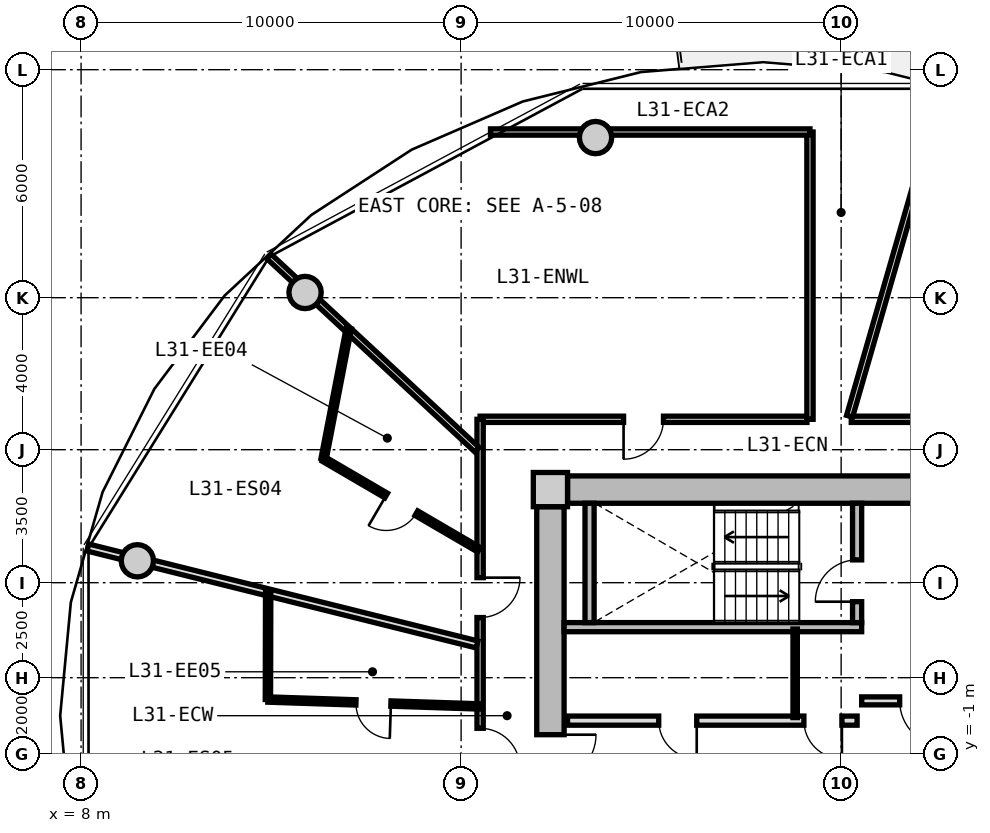
"""IFC4 building model, lengths in metres.
Left out: names, types, materials, properties, quantities, classifications, styles, units other than length and angle.
Written with IfcOpenShell. Run it as: python <this file> out.ifc"""

import sys

from ifc_helpers import new_model, si_unit, direction, frame, frame_2d, origin, origin_2d, place, context, subcontext, project, spatial, rectangle, circle, extrude, source, transform, mapped, element, fill, save


model = new_model("IFC4")
c1 = context("Model", 3, precision=1e-05, world=origin(), true_north=direction((0.0, 1.0)))
c2 = subcontext(c1, "Body", "Model", "MODEL_VIEW")
j1 = project(units=[si_unit("LENGTHUNIT", "METRE"), si_unit("PLANEANGLEUNIT", "RADIAN")], contexts=[c1])
p1 = place(None, origin())
s1 = spatial("IfcSite", under=j1, at=p1, CompositionType="ELEMENT")
p2 = place(p1, origin())
s2 = spatial("IfcBuilding", under=s1, at=p2, CompositionType="ELEMENT")
p3 = place(p2, frame((0.0, 0.0, 102.35)))
s3 = spatial("IfcBuildingStorey", under=s2, at=p3, CompositionType="ELEMENT", Elevation=102.35)
m1 = source(origin(), c2, "Body", "SweptSolid", [
    extrude(rectangle(XDim=0.9, YDim=0.9, at=origin_2d()), origin(), (0.0, 0.0, 1.0), 3.05),
])
p4 = place(p3, frame((20.35, 5.95, 0.0), z_axis=(0.0, 0.0, 1.0), x_axis=(1.0, 0.0, 0.0)))
e1 = element("IfcColumn", 1, at=p4, inside=s3, PredefinedType="COLUMN", context=c2, shape_type="MappedRepresentation", body=[
    mapped(m1, transform((0.0, 0.0, 0.0), x_axis=(1.0, 0.0, 0.0), y_axis=(0.0, 1.0, 0.0), z_axis=(0.0, 0.0, 1.0), scale=1.0)),
])
m2 = source(origin(), c2, "Body", "SweptSolid", [
    extrude(rectangle(XDim=14.4, YDim=0.72, at=frame_2d((7.2, 0.0))), origin(), (0.0, 0.0, 1.0), 2.79),
])
p5 = place(p3, frame((20.8, 5.95, 0.0), z_axis=(0.0, 0.0, 1.0), x_axis=(1.0, 0.0, 0.0)))
e2 = element("IfcWall", 2, at=p5, inside=s3, PredefinedType="SHEAR", context=c2, shape_type="MappedRepresentation", body=[
    mapped(m2, transform((0.0, 0.0, 0.0), x_axis=(1.0, 0.0, 0.0), y_axis=(0.0, 1.0, 0.0), z_axis=(0.0, 0.0, 1.0), scale=1.0)),
])
m3 = source(origin(), c2, "Body", "SweptSolid", [
    extrude(rectangle(XDim=11.0, YDim=0.72, at=frame_2d((5.5, 0.0))), origin(), (0.0, 0.0, 1.0), 2.79),
])
p6 = place(p3, frame((20.35, -5.5, 0.0), z_axis=(0.0, 0.0, 1.0), x_axis=(0.0, 1.0, 0.0)))
e3 = element("IfcWall", 3, at=p6, inside=s3, PredefinedType="SHEAR", context=c2, shape_type="MappedRepresentation", body=[
    mapped(m3, transform((0.0, 0.0, 0.0), x_axis=(1.0, 0.0, 0.0), y_axis=(0.0, 1.0, 0.0), z_axis=(0.0, 0.0, 1.0), scale=1.0)),
])
p7 = place(p6, frame((3.8, 0.0, 0.0)))
e4 = element("IfcOpeningElement", 4, at=p7, cuts=e3, PredefinedType="OPENING", context=c2, shape_type="SweptSolid", body=[
    extrude(rectangle(XDim=1.2, YDim=2.15, at=frame_2d((0.6, 1.075))), frame((0.0, 0.37, 0.0), z_axis=(0.0, -1.0, 0.0), x_axis=(1.0, 0.0, 0.0)), (0.0, 0.0, 1.0), 0.74),
])
m4 = source(origin(), c2, "Body", "SweptSolid", [
    extrude(circle(Radius=0.425, at=origin_2d()), origin(), (0.0, 0.0, 1.0), 3.05),
])
for number, where, z_axis, x_axis in (
    (5, (21.537, 15.213, 0.0), (0.0, 0.0, 1.0), (1.0, 0.0, 0.0)),
    (6, (13.894, 11.137, 0.0), (0.0, 0.0, 1.0), (1.0, 0.0, 0.0)),
    (7, (9.481, 4.076, 0.0), (0.0, 0.0, 1.0), (1.0, 0.0, 0.0)),
):
    element("IfcColumn", number, at=place(p3, frame(where, z_axis=z_axis, x_axis=x_axis)), inside=s3, PredefinedType="COLUMN", context=c2, shape_type="MappedRepresentation", body=[
        mapped(m4, transform((0.0, 0.0, 0.0), x_axis=(1.0, 0.0, 0.0), y_axis=(0.0, 1.0, 0.0), z_axis=(0.0, 0.0, 1.0), scale=1.0)),
    ])
m5 = source(origin(), c2, "Body", "SweptSolid", [
    extrude(rectangle(XDim=7.83, YDim=0.24, at=frame_2d((3.915, 0.0))), origin(), (0.0, 0.0, 1.0), 2.79),
])
p8 = place(p3, frame((20.71, 2.33, 0.0), z_axis=(0.0, 0.0, 1.0), x_axis=(1.0, 0.0, 0.0)))
e8 = element("IfcWall", 8, at=p8, inside=s3, PredefinedType="PARTITIONING", context=c2, shape_type="MappedRepresentation", body=[
    mapped(m5, transform((0.0, 0.0, 0.0), x_axis=(1.0, 0.0, 0.0), y_axis=(0.0, 1.0, 0.0), z_axis=(0.0, 0.0, 1.0), scale=1.0)),
])
m6 = source(origin(), c2, "Body", "SweptSolid", [
    extrude(rectangle(XDim=3.14, YDim=0.24, at=frame_2d((1.57, 0.0))), origin(), (0.0, 0.0, 1.0), 2.79),
])
p9 = place(p3, frame((21.38, 2.45, 0.0), z_axis=(0.0, 0.0, 1.0), x_axis=(0.0, 1.0, 0.0)))
e9 = element("IfcWall", 9, at=p9, inside=s3, PredefinedType="PARTITIONING", context=c2, shape_type="MappedRepresentation", body=[
    mapped(m6, transform((0.0, 0.0, 0.0), x_axis=(1.0, 0.0, 0.0), y_axis=(0.0, 1.0, 0.0), z_axis=(0.0, 0.0, 1.0), scale=1.0)),
])
p10 = place(p3, frame((28.42, 2.45, 0.0), z_axis=(0.0, 0.0, 1.0), x_axis=(0.0, 1.0, 0.0)))
e10 = element("IfcWall", 10, at=p10, inside=s3, PredefinedType="PARTITIONING", context=c2, shape_type="MappedRepresentation", body=[
    mapped(m6, transform((0.0, 0.0, 0.0), x_axis=(1.0, 0.0, 0.0), y_axis=(0.0, 1.0, 0.0), z_axis=(0.0, 0.0, 1.0), scale=1.0)),
])
p11 = place(p10, frame((0.55, 0.0, 0.0)))
e11 = element("IfcOpeningElement", 11, at=p11, cuts=e10, PredefinedType="OPENING", context=c2, shape_type="SweptSolid", body=[
    extrude(rectangle(XDim=1.1, YDim=2.15, at=frame_2d((0.55, 1.075))), frame((0.0, 0.13, 0.0), z_axis=(0.0, -1.0, 0.0), x_axis=(1.0, 0.0, 0.0)), (0.0, 0.0, 1.0), 0.26),
])
m7 = source(origin(), c2, "Body", "SweptSolid", [
    extrude(rectangle(XDim=6.66, YDim=0.21, at=frame_2d((3.33, 0.0))), origin(), (0.0, 0.0, 1.0), 2.775),
])
p12 = place(p3, frame((28.54, 0.39, 0.0), z_axis=(0.0, 0.0, 1.0), x_axis=(1.0, 0.0, 0.0)))
e12 = element("IfcWall", 12, at=p12, inside=s3, PredefinedType="PARTITIONING", context=c2, shape_type="MappedRepresentation", body=[
    mapped(m7, transform((0.0, 0.0, 0.0), x_axis=(1.0, 0.0, 0.0), y_axis=(0.0, 1.0, 0.0), z_axis=(0.0, 0.0, 1.0), scale=1.0)),
])
p13 = place(p12, frame((1.0, 0.0, 0.0)))
e13 = element("IfcOpeningElement", 13, at=p13, cuts=e12, PredefinedType="OPENING", context=c2, shape_type="SweptSolid", body=[
    extrude(rectangle(XDim=1.2, YDim=2.15, at=frame_2d((0.6, 1.075))), frame((0.0, 0.115, 0.0), z_axis=(0.0, -1.0, 0.0), x_axis=(1.0, 0.0, 0.0)), (0.0, 0.0, 1.0), 0.23),
])
m8 = source(origin(), c2, "Body", "SweptSolid", [
    extrude(rectangle(XDim=7.62, YDim=0.24, at=frame_2d((3.81, 0.0))), origin(), (0.0, 0.0, 1.0), 2.775),
])
p14 = place(p3, frame((20.8, -0.13, 0.0), z_axis=(0.0, 0.0, 1.0), x_axis=(1.0, 0.0, 0.0)))
e14 = element("IfcWall", 14, at=p14, inside=s3, PredefinedType="PARTITIONING", context=c2, shape_type="MappedRepresentation", body=[
    mapped(m8, transform((0.0, 0.0, 0.0), x_axis=(1.0, 0.0, 0.0), y_axis=(0.0, 1.0, 0.0), z_axis=(0.0, 0.0, 1.0), scale=1.0)),
])
p15 = place(p14, frame((6.22, 0.0, 0.0)))
e15 = element("IfcOpeningElement", 15, at=p15, cuts=e14, PredefinedType="OPENING", context=c2, shape_type="SweptSolid", body=[
    extrude(rectangle(XDim=1.0, YDim=2.1, at=frame_2d((0.5, 1.05))), frame((0.0, 0.13, 0.0), z_axis=(0.0, -1.0, 0.0), x_axis=(1.0, 0.0, 0.0)), (0.0, 0.0, 1.0), 0.26),
])
p16 = place(p14, frame((2.4, 0.0, 0.0)))
e16 = element("IfcOpeningElement", 16, at=p16, cuts=e14, PredefinedType="OPENING", context=c2, shape_type="SweptSolid", body=[
    extrude(rectangle(XDim=1.0, YDim=2.1, at=frame_2d((0.5, 1.05))), frame((0.0, 0.13, 0.0), z_axis=(0.0, -1.0, 0.0), x_axis=(1.0, 0.0, 0.0)), (0.0, 0.0, 1.0), 0.26),
])
m9 = source(origin(), c2, "Body", "SweptSolid", [
    extrude(rectangle(XDim=2.33, YDim=0.115, at=frame_2d((1.165, 0.0))), origin(), (0.0, 0.0, 1.0), 2.775),
])
p17 = place(p3, frame((26.79, -0.05, 0.0), z_axis=(0.0, 0.0, 1.0), x_axis=(0.0, 1.0, 0.0)))
e17 = element("IfcWall", 17, at=p17, inside=s3, PredefinedType="PARTITIONING", context=c2, shape_type="MappedRepresentation", body=[
    mapped(m9, transform((0.0, 0.0, 0.0), x_axis=(1.0, 0.0, 0.0), y_axis=(0.0, 1.0, 0.0), z_axis=(0.0, 0.0, 1.0), scale=1.0)),
])
m10 = source(origin(), c2, "Body", "SweptSolid", [
    extrude(rectangle(XDim=8.6, YDim=0.165, at=frame_2d((4.3, 0.0))), origin(), (0.0, 0.0, 1.0), 2.775),
])
p18 = place(p3, frame((18.5, 7.8, 0.0), z_axis=(0.0, 0.0, 1.0), x_axis=(1.0, 0.0, 0.0)))
e18 = element("IfcWall", 18, at=p18, inside=s3, PredefinedType="PARTITIONING", context=c2, shape_type="MappedRepresentation", body=[
    mapped(m10, transform((0.0, 0.0, 0.0), x_axis=(1.0, 0.0, 0.0), y_axis=(0.0, 1.0, 0.0), z_axis=(0.0, 0.0, 1.0), scale=1.0)),
])
p19 = place(p18, frame((3.775, 0.0, 0.0)))
e19 = element("IfcOpeningElement", 19, at=p19, cuts=e18, PredefinedType="OPENING", context=c2, shape_type="SweptSolid", body=[
    extrude(rectangle(XDim=1.05, YDim=2.15, at=frame_2d((0.525, 1.075))), frame((0.0, 0.093, 0.0), z_axis=(0.0, -1.0, 0.0), x_axis=(1.0, 0.0, 0.0)), (0.0, 0.0, 1.0), 0.185),
])
m11 = source(origin(), c2, "Body", "SweptSolid", [
    extrude(rectangle(XDim=9.234, YDim=0.165, at=frame_2d((4.617, 0.0))), origin(), (0.0, 0.0, 1.0), 2.775),
])
p20 = place(p3, frame((28.266, 7.8, 0.0), z_axis=(0.0, 0.0, 1.0), x_axis=(1.0, 0.0, 0.0)))
e20 = element("IfcWall", 20, at=p20, inside=s3, PredefinedType="PARTITIONING", context=c2, shape_type="MappedRepresentation", body=[
    mapped(m11, transform((0.0, 0.0, 0.0), x_axis=(1.0, 0.0, 0.0), y_axis=(0.0, 1.0, 0.0), z_axis=(0.0, 0.0, 1.0), scale=1.0)),
])
p21 = place(p20, frame((2.588, 0.0, 0.0)))
e21 = element("IfcOpeningElement", 21, at=p21, cuts=e20, PredefinedType="OPENING", context=c2, shape_type="SweptSolid", body=[
    extrude(rectangle(XDim=1.25, YDim=2.2, at=frame_2d((0.625, 1.1))), frame((0.0, 0.093, 0.0), z_axis=(0.0, -1.0, 0.0), x_axis=(1.0, 0.0, 0.0)), (0.0, 0.0, 1.0), 0.185),
])
m12 = source(origin(), c2, "Body", "SweptSolid", [
    extrude(rectangle(XDim=15.6, YDim=0.165, at=frame_2d((7.8, 0.0))), origin(), (0.0, 0.0, 1.0), 2.775),
])
p22 = place(p3, frame((18.5, -7.8, 0.0), z_axis=(0.0, 0.0, 1.0), x_axis=(0.0, 1.0, 0.0)))
e22 = element("IfcWall", 22, at=p22, inside=s3, PredefinedType="PARTITIONING", context=c2, shape_type="MappedRepresentation", body=[
    mapped(m12, transform((0.0, 0.0, 0.0), x_axis=(1.0, 0.0, 0.0), y_axis=(0.0, 1.0, 0.0), z_axis=(0.0, 0.0, 1.0), scale=1.0)),
])
p23 = place(p22, frame((10.383, 0.0, 0.0)))
e23 = element("IfcOpeningElement", 23, at=p23, cuts=e22, PredefinedType="OPENING", context=c2, shape_type="SweptSolid", body=[
    extrude(rectangle(XDim=1.05, YDim=2.15, at=frame_2d((0.525, 1.075))), frame((0.0, 0.093, 0.0), z_axis=(0.0, -1.0, 0.0), x_axis=(1.0, 0.0, 0.0)), (0.0, 0.0, 1.0), 0.185),
])
p24 = place(p22, frame((6.419, 0.0, 0.0)))
e24 = element("IfcOpeningElement", 24, at=p24, cuts=e22, PredefinedType="OPENING", context=c2, shape_type="SweptSolid", body=[
    extrude(rectangle(XDim=1.05, YDim=2.15, at=frame_2d((0.525, 1.075))), frame((0.0, 0.093, 0.0), z_axis=(0.0, -1.0, 0.0), x_axis=(1.0, 0.0, 0.0)), (0.0, 0.0, 1.0), 0.185),
])
p25 = place(p22, frame((1.821, 0.0, 0.0)))
e25 = element("IfcOpeningElement", 25, at=p25, cuts=e22, PredefinedType="OPENING", context=c2, shape_type="SweptSolid", body=[
    extrude(rectangle(XDim=1.05, YDim=2.15, at=frame_2d((0.525, 1.075))), frame((0.0, 0.093, 0.0), z_axis=(0.0, -1.0, 0.0), x_axis=(1.0, 0.0, 0.0)), (0.0, 0.0, 1.0), 0.185),
])
m13 = source(origin(), c2, "Body", "SweptSolid", [
    extrude(rectangle(XDim=8.989, YDim=0.165, at=frame_2d((4.495, 0.0))), origin(), (0.0, 0.0, 1.0), 2.275),
])
p26 = place(p3, frame((28.222, 7.88, 0.0), z_axis=(0.0, 0.0, 1.0), x_axis=(0.27702323008, 0.960863221274, 0.0)))
e26 = element("IfcWall", 26, at=p26, inside=s3, PredefinedType="PARTITIONING", context=c2, shape_type="MappedRepresentation", body=[
    mapped(m13, transform((0.0, 0.0, 0.0), x_axis=(1.0, 0.0, 0.0), y_axis=(0.0, 1.0, 0.0), z_axis=(0.0, 0.0, 1.0), scale=1.0)),
])
m14 = source(origin(), c2, "Body", "SweptSolid", [
    extrude(rectangle(XDim=7.482, YDim=0.165, at=frame_2d((3.741, 0.0))), origin(), (0.0, 0.0, 1.0), 2.275),
])
p27 = place(p3, frame((18.42, 6.998, 0.0), z_axis=(0.0, 0.0, 1.0), x_axis=(-0.732508698043, 0.680757671489, 0.0)))
e27 = element("IfcWall", 27, at=p27, inside=s3, PredefinedType="PARTITIONING", context=c2, shape_type="MappedRepresentation", body=[
    mapped(m14, transform((0.0, 0.0, 0.0), x_axis=(1.0, 0.0, 0.0), y_axis=(0.0, 1.0, 0.0), z_axis=(0.0, 0.0, 1.0), scale=1.0)),
])
m15 = source(origin(), c2, "Body", "SweptSolid", [
    extrude(rectangle(XDim=7.56, YDim=0.165, at=frame_2d((3.78, 0.0))), origin(), (0.0, 0.0, 1.0), 2.775),
])
p28 = place(p3, frame((27.18, 7.8, 0.0), z_axis=(0.0, 0.0, 1.0), x_axis=(0.0, 1.0, 0.0)))
e28 = element("IfcWall", 28, at=p28, inside=s3, PredefinedType="PARTITIONING", context=c2, shape_type="MappedRepresentation", body=[
    mapped(m15, transform((0.0, 0.0, 0.0), x_axis=(1.0, 0.0, 0.0), y_axis=(0.0, 1.0, 0.0), z_axis=(0.0, 0.0, 1.0), scale=1.0)),
])
m16 = source(origin(), c2, "Body", "SweptSolid", [
    extrude(rectangle(XDim=8.407, YDim=0.165, at=frame_2d((4.204, 0.0))), origin(), (0.0, 0.0, 1.0), 2.275),
])
p29 = place(p3, frame((18.773, 15.36, 0.0), z_axis=(0.0, 0.0, 1.0), x_axis=(1.0, 0.0, 0.0)))
e29 = element("IfcWall", 29, at=p29, inside=s3, PredefinedType="PARTITIONING", context=c2, shape_type="MappedRepresentation", body=[
    mapped(m16, transform((0.0, 0.0, 0.0), x_axis=(1.0, 0.0, 0.0), y_axis=(0.0, 1.0, 0.0), z_axis=(0.0, 0.0, 1.0), scale=1.0)),
])
m17 = source(origin(), c2, "Body", "SweptSolid", [
    extrude(rectangle(XDim=10.556, YDim=0.19, at=frame_2d((5.278, 0.0))), origin(), (0.0, 0.0, 1.0), 2.275),
])
p30 = place(p3, frame((18.42, 1.875, 0.0), z_axis=(0.0, 0.0, 1.0), x_axis=(-0.970363857851, 0.241648470667, 0.0)))
e30 = element("IfcWall", 30, at=p30, inside=s3, PredefinedType="PARTITIONING", context=c2, shape_type="MappedRepresentation", body=[
    mapped(m17, transform((0.0, 0.0, 0.0), x_axis=(1.0, 0.0, 0.0), y_axis=(0.0, 1.0, 0.0), z_axis=(0.0, 0.0, 1.0), scale=1.0)),
])
m18 = source(origin(), c2, "Body", "SweptSolid", [
    extrude(rectangle(XDim=4.735, YDim=0.14, at=frame_2d((2.368, 0.0))), origin(), (0.0, 0.0, 1.0), 2.775),
])
p31 = place(p3, frame((18.47, 4.368, 0.0), z_axis=(0.0, 0.0, 1.0), x_axis=(-0.863537576642, 0.504284496814, 0.0)))
e31 = element("IfcWall", 31, at=p31, inside=s3, PredefinedType="PARTITIONING", context=c2, shape_type="MappedRepresentation", body=[
    mapped(m18, transform((0.0, 0.0, 0.0), x_axis=(1.0, 0.0, 0.0), y_axis=(0.0, 1.0, 0.0), z_axis=(0.0, 0.0, 1.0), scale=1.0)),
])
p32 = place(p31, frame((1.908, 0.0, 0.0)))
e32 = element("IfcOpeningElement", 32, at=p32, cuts=e31, PredefinedType="OPENING", context=c2, shape_type="SweptSolid", body=[
    extrude(rectangle(XDim=0.92, YDim=2.1, at=frame_2d((0.46, 1.05))), frame((0.0, 0.08, 0.0), z_axis=(0.0, -1.0, 0.0), x_axis=(1.0, 0.0, 0.0)), (0.0, 0.0, 1.0), 0.16),
])
m19 = source(origin(), c2, "Body", "SweptSolid", [
    extrude(rectangle(XDim=3.499, YDim=0.14, at=frame_2d((1.75, 0.0))), origin(), (0.0, 0.0, 1.0), 2.775),
])
p33 = place(p3, frame((14.381, 6.756, 0.0), z_axis=(0.0, 0.0, 1.0), x_axis=(0.18957713629, 0.981865830649, 0.0)))
e33 = element("IfcWall", 33, at=p33, inside=s3, PredefinedType="PARTITIONING", context=c2, shape_type="MappedRepresentation", body=[
    mapped(m19, transform((0.0, 0.0, 0.0), x_axis=(1.0, 0.0, 0.0), y_axis=(0.0, 1.0, 0.0), z_axis=(0.0, 0.0, 1.0), scale=1.0)),
])
m20 = source(origin(), c2, "Body", "SweptSolid", [
    extrude(rectangle(XDim=5.557, YDim=0.14, at=frame_2d((2.778, 0.0))), origin(), (0.0, 0.0, 1.0), 2.775),
])
p34 = place(p3, frame((18.47, 0.244, 0.0), z_axis=(0.0, 0.0, 1.0), x_axis=(-0.999468495627, 0.03259948234, 0.0)))
e34 = element("IfcWall", 34, at=p34, inside=s3, PredefinedType="PARTITIONING", context=c2, shape_type="MappedRepresentation", body=[
    mapped(m20, transform((0.0, 0.0, 0.0), x_axis=(1.0, 0.0, 0.0), y_axis=(0.0, 1.0, 0.0), z_axis=(0.0, 0.0, 1.0), scale=1.0)),
])
p35 = place(p34, frame((2.318, 0.0, 0.0)))
e35 = element("IfcOpeningElement", 35, at=p35, cuts=e34, PredefinedType="OPENING", context=c2, shape_type="SweptSolid", body=[
    extrude(rectangle(XDim=0.92, YDim=2.1, at=frame_2d((0.46, 1.05))), frame((0.0, 0.08, 0.0), z_axis=(0.0, -1.0, 0.0), x_axis=(1.0, 0.0, 0.0)), (0.0, 0.0, 1.0), 0.16),
])
m21 = source(origin(), c2, "Body", "SweptSolid", [
    extrude(rectangle(XDim=2.837, YDim=0.14, at=frame_2d((1.418, 0.0))), origin(), (0.0, 0.0, 1.0), 2.775),
])
p36 = place(p3, frame((12.916, 0.425, 0.0), z_axis=(0.0, 0.0, 1.0), x_axis=(0.002409838945, 0.999997096334, 0.0)))
e36 = element("IfcWall", 36, at=p36, inside=s3, PredefinedType="PARTITIONING", context=c2, shape_type="MappedRepresentation", body=[
    mapped(m21, transform((0.0, 0.0, 0.0), x_axis=(1.0, 0.0, 0.0), y_axis=(0.0, 1.0, 0.0), z_axis=(0.0, 0.0, 1.0), scale=1.0)),
])
m22 = source(origin(), c2, "Body", "SweptSolid", [
    extrude(rectangle(XDim=1.1, YDim=2.15, at=frame_2d((0.55, 1.075))), frame((0.0, 0.025, 0.0), z_axis=(0.0, -1.0, 0.0), x_axis=(1.0, 0.0, 0.0)), (0.0, 0.0, 1.0), 0.05),
])
p37 = place(p11, origin())
e37 = element("IfcDoor", 37, at=p37, inside=s3, OperationType="SINGLE_SWING_LEFT", PredefinedType="DOOR", context=c2, shape_type="MappedRepresentation", body=[
    mapped(m22, transform((0.0, 0.0, 0.0), x_axis=(1.0, 0.0, 0.0), y_axis=(0.0, 1.0, 0.0), z_axis=(0.0, 0.0, 1.0), scale=1.0)),
])
fill(e11, e37)
m23 = source(origin(), c2, "Body", "SweptSolid", [
    extrude(rectangle(XDim=1.2, YDim=2.15, at=frame_2d((0.6, 1.075))), frame((0.0, 0.025, 0.0), z_axis=(0.0, -1.0, 0.0), x_axis=(1.0, 0.0, 0.0)), (0.0, 0.0, 1.0), 0.05),
])
p38 = place(p13, frame((1.2, 0.0, 0.0), z_axis=(0.0, 0.0, 1.0), x_axis=(-1.0, 0.0, 0.0)))
e38 = element("IfcDoor", 38, at=p38, inside=s3, OperationType="SINGLE_SWING_LEFT", PredefinedType="DOOR", context=c2, shape_type="MappedRepresentation", body=[
    mapped(m23, transform((0.0, 0.0, 0.0), x_axis=(1.0, 0.0, 0.0), y_axis=(0.0, 1.0, 0.0), z_axis=(0.0, 0.0, 1.0), scale=1.0)),
])
fill(e13, e38)
p39 = place(p7, frame((1.2, 0.0, 0.0), z_axis=(0.0, 0.0, 1.0), x_axis=(-1.0, 0.0, 0.0)))
e39 = element("IfcDoor", 39, at=p39, inside=s3, OperationType="SINGLE_SWING_LEFT", PredefinedType="DOOR", context=c2, shape_type="MappedRepresentation", body=[
    mapped(m23, transform((0.0, 0.0, 0.0), x_axis=(1.0, 0.0, 0.0), y_axis=(0.0, 1.0, 0.0), z_axis=(0.0, 0.0, 1.0), scale=1.0)),
])
fill(e4, e39)
m24 = source(origin(), c2, "Body", "SweptSolid", [
    extrude(rectangle(XDim=1.0, YDim=2.1, at=frame_2d((0.5, 1.05))), frame((0.0, 0.025, 0.0), z_axis=(0.0, -1.0, 0.0), x_axis=(1.0, 0.0, 0.0)), (0.0, 0.0, 1.0), 0.05),
])
p40 = place(p15, frame((1.0, 0.0, 0.0), z_axis=(0.0, 0.0, 1.0), x_axis=(-1.0, 0.0, 0.0)))
e40 = element("IfcDoor", 40, at=p40, inside=s3, OperationType="SINGLE_SWING_LEFT", PredefinedType="DOOR", context=c2, shape_type="MappedRepresentation", body=[
    mapped(m24, transform((0.0, 0.0, 0.0), x_axis=(1.0, 0.0, 0.0), y_axis=(0.0, 1.0, 0.0), z_axis=(0.0, 0.0, 1.0), scale=1.0)),
])
fill(e15, e40)
p41 = place(p16, frame((1.0, 0.0, 0.0), z_axis=(0.0, 0.0, 1.0), x_axis=(-1.0, 0.0, 0.0)))
e41 = element("IfcDoor", 41, at=p41, inside=s3, OperationType="SINGLE_SWING_LEFT", PredefinedType="DOOR", context=c2, shape_type="MappedRepresentation", body=[
    mapped(m24, transform((0.0, 0.0, 0.0), x_axis=(1.0, 0.0, 0.0), y_axis=(0.0, 1.0, 0.0), z_axis=(0.0, 0.0, 1.0), scale=1.0)),
])
fill(e16, e41)
m25 = source(origin(), c2, "Body", "SweptSolid", [
    extrude(rectangle(XDim=1.05, YDim=2.15, at=frame_2d((0.525, 1.075))), frame((0.0, 0.025, 0.0), z_axis=(0.0, -1.0, 0.0), x_axis=(1.0, 0.0, 0.0)), (0.0, 0.0, 1.0), 0.05),
])
p42 = place(p19, frame((1.05, 0.0, 0.0), z_axis=(0.0, 0.0, 1.0), x_axis=(-1.0, 0.0, 0.0)))
e42 = element("IfcDoor", 42, at=p42, inside=s3, OperationType="SINGLE_SWING_RIGHT", PredefinedType="DOOR", context=c2, shape_type="MappedRepresentation", body=[
    mapped(m25, transform((0.0, 0.0, 0.0), x_axis=(1.0, 0.0, 0.0), y_axis=(0.0, 1.0, 0.0), z_axis=(0.0, 0.0, 1.0), scale=1.0)),
])
fill(e19, e42)
p43 = place(p23, frame((1.05, 0.0, 0.0), z_axis=(0.0, 0.0, 1.0), x_axis=(-1.0, 0.0, 0.0)))
e43 = element("IfcDoor", 43, at=p43, inside=s3, OperationType="SINGLE_SWING_LEFT", PredefinedType="DOOR", context=c2, shape_type="MappedRepresentation", body=[
    mapped(m25, transform((0.0, 0.0, 0.0), x_axis=(1.0, 0.0, 0.0), y_axis=(0.0, 1.0, 0.0), z_axis=(0.0, 0.0, 1.0), scale=1.0)),
])
fill(e23, e43)
m26 = source(origin(), c2, "Body", "SweptSolid", [
    extrude(rectangle(XDim=0.92, YDim=2.1, at=frame_2d((0.46, 1.05))), frame((0.0, 0.025, 0.0), z_axis=(0.0, -1.0, 0.0), x_axis=(1.0, 0.0, 0.0)), (0.0, 0.0, 1.0), 0.05),
])
p44 = place(p32, origin())
e44 = element("IfcDoor", 44, at=p44, inside=s3, OperationType="SINGLE_SWING_RIGHT", PredefinedType="DOOR", context=c2, shape_type="MappedRepresentation", body=[
    mapped(m26, transform((0.0, 0.0, 0.0), x_axis=(1.0, 0.0, 0.0), y_axis=(0.0, 1.0, 0.0), z_axis=(0.0, 0.0, 1.0), scale=1.0)),
])
fill(e32, e44)
p45 = place(p24, frame((1.05, 0.0, 0.0), z_axis=(0.0, 0.0, 1.0), x_axis=(-1.0, 0.0, 0.0)))
e45 = element("IfcDoor", 45, at=p45, inside=s3, OperationType="SINGLE_SWING_RIGHT", PredefinedType="DOOR", context=c2, shape_type="MappedRepresentation", body=[
    mapped(m25, transform((0.0, 0.0, 0.0), x_axis=(1.0, 0.0, 0.0), y_axis=(0.0, 1.0, 0.0), z_axis=(0.0, 0.0, 1.0), scale=1.0)),
])
fill(e24, e45)
p46 = place(p35, origin())
e46 = element("IfcDoor", 46, at=p46, inside=s3, OperationType="SINGLE_SWING_LEFT", PredefinedType="DOOR", context=c2, shape_type="MappedRepresentation", body=[
    mapped(m26, transform((0.0, 0.0, 0.0), x_axis=(1.0, 0.0, 0.0), y_axis=(0.0, 1.0, 0.0), z_axis=(0.0, 0.0, 1.0), scale=1.0)),
])
fill(e35, e46)
save(model, sys.argv[1])
